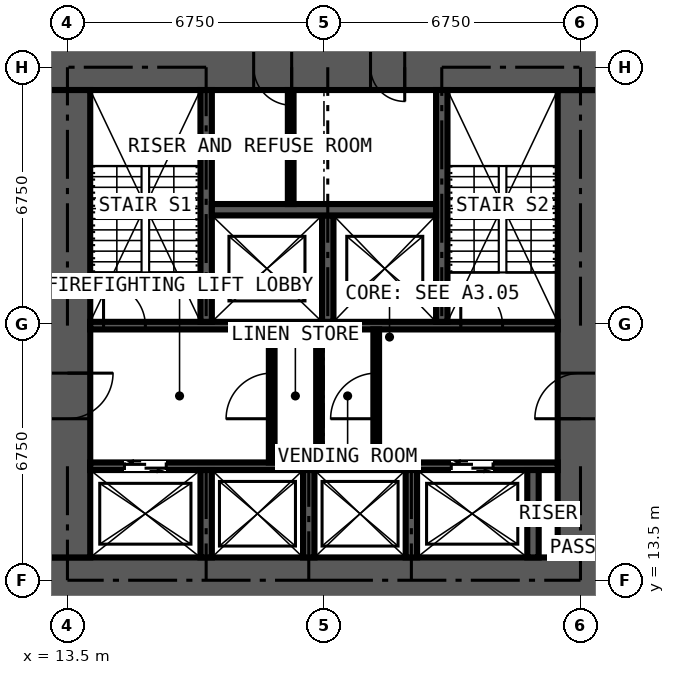
"""IFC4 building model, lengths in metres.
Left out: names, types, materials, properties, quantities, classifications, styles, units other than length and angle.
Written with IfcOpenShell. Run it as: python <this file> out.ifc"""

import sys

from ifc_helpers import new_model, si_unit, direction, frame, frame_2d, origin, place, context, subcontext, project, spatial, rectangle, extrude, element, fill, save


model = new_model("IFC4")
c1 = context("Model", 3, precision=1e-05, world=origin(), true_north=direction((0.0, 1.0)))
c2 = subcontext(c1, "Body", "Model", "MODEL_VIEW")
j1 = project(units=[si_unit("LENGTHUNIT", "METRE"), si_unit("PLANEANGLEUNIT", "RADIAN")], contexts=[c1])
p1 = place(None, origin())
s1 = spatial("IfcSite", under=j1, at=p1, CompositionType="ELEMENT")
p2 = place(p1, origin())
s2 = spatial("IfcBuilding", under=s1, at=p2, CompositionType="ELEMENT")
p3 = place(p2, frame((0.0, 0.0, 87.3)))
s3 = spatial("IfcBuildingStorey", under=s2, at=p3, CompositionType="ELEMENT", Elevation=87.3)
p4 = place(p3, frame((12.9, 13.5, 0.0), z_axis=(0.0, 0.0, 1.0), x_axis=(1.0, 0.0, 0.0)))
e1 = element("IfcWall", 1, at=p4, inside=s3, PredefinedType="SHEAR", context=c2, shape_type="SweptSolid", body=[
    extrude(rectangle(XDim=14.7, YDim=1.2, at=frame_2d((7.35, 0.0))), origin(), (0.0, 0.0, 1.0), 3.6),
])
p5 = place(p3, frame((27.0, 14.1, 0.0), z_axis=(0.0, 0.0, 1.0), x_axis=(0.0, 1.0, 0.0)))
e2 = element("IfcWall", 2, at=p5, inside=s3, PredefinedType="SHEAR", context=c2, shape_type="SweptSolid", body=[
    extrude(rectangle(XDim=12.3, YDim=1.2, at=frame_2d((6.15, 0.0))), origin(), (0.0, 0.0, 1.0), 3.6),
])
p6 = place(p5, frame((3.65, 0.0, 0.0)))
e3 = element("IfcOpeningElement", 3, at=p6, cuts=e2, PredefinedType="OPENING", context=c2, shape_type="SweptSolid", body=[
    extrude(rectangle(XDim=1.2, YDim=2.2, at=frame_2d((0.6, 1.1))), frame((0.0, 0.61, 0.0), z_axis=(0.0, -1.0, 0.0), x_axis=(1.0, 0.0, 0.0)), (0.0, 0.0, 1.0), 1.22),
])
p7 = place(p3, frame((27.6, 27.0, 0.0), z_axis=(0.0, 0.0, 1.0), x_axis=(-1.0, 0.0, 0.0)))
e4 = element("IfcWall", 4, at=p7, inside=s3, PredefinedType="SHEAR", context=c2, shape_type="SweptSolid", body=[
    extrude(rectangle(XDim=14.7, YDim=1.2, at=frame_2d((7.35, 0.0))), origin(), (0.0, 0.0, 1.0), 3.6),
])
p8 = place(p7, frame((5.225, 0.0, 0.0)))
e5 = element("IfcOpeningElement", 5, at=p8, cuts=e4, PredefinedType="OPENING", context=c2, shape_type="SweptSolid", body=[
    extrude(rectangle(XDim=0.9, YDim=2.2, at=frame_2d((0.45, 1.1))), frame((0.0, 0.61, 0.0), z_axis=(0.0, -1.0, 0.0), x_axis=(1.0, 0.0, 0.0)), (0.0, 0.0, 1.0), 1.22),
])
p9 = place(p7, frame((8.2, 0.0, 0.0)))
e6 = element("IfcOpeningElement", 6, at=p9, cuts=e4, PredefinedType="OPENING", context=c2, shape_type="SweptSolid", body=[
    extrude(rectangle(XDim=1.0, YDim=2.2, at=frame_2d((0.5, 1.1))), frame((0.0, 0.61, 0.0), z_axis=(0.0, -1.0, 0.0), x_axis=(1.0, 0.0, 0.0)), (0.0, 0.0, 1.0), 1.22),
])
p10 = place(p3, frame((13.5, 26.4, 0.0), z_axis=(0.0, 0.0, 1.0), x_axis=(0.0, -1.0, 0.0)))
e7 = element("IfcWall", 7, at=p10, inside=s3, PredefinedType="SHEAR", context=c2, shape_type="SweptSolid", body=[
    extrude(rectangle(XDim=12.3, YDim=1.2, at=frame_2d((6.15, 0.0))), origin(), (0.0, 0.0, 1.0), 3.6),
])
p11 = place(p10, frame((7.45, 0.0, 0.0)))
e8 = element("IfcOpeningElement", 8, at=p11, cuts=e7, PredefinedType="OPENING", context=c2, shape_type="SweptSolid", body=[
    extrude(rectangle(XDim=1.2, YDim=2.2, at=frame_2d((0.6, 1.1))), frame((0.0, 0.61, 0.0), z_axis=(0.0, -1.0, 0.0), x_axis=(1.0, 0.0, 0.0)), (0.0, 0.0, 1.0), 1.22),
])
p12 = place(p3, frame((14.1, 16.5, 0.0), z_axis=(0.0, 0.0, 1.0), x_axis=(1.0, 0.0, 0.0)))
e9 = element("IfcWall", 9, at=p12, inside=s3, PredefinedType="SHEAR", context=c2, shape_type="SweptSolid", body=[
    extrude(rectangle(XDim=12.3, YDim=0.2, at=frame_2d((6.15, 0.0))), origin(), (0.0, 0.0, 1.0), 3.6),
])
p13 = place(p12, frame((0.9, 0.0, 0.0)))
e10 = element("IfcOpeningElement", 10, at=p13, cuts=e9, PredefinedType="OPENING", context=c2, shape_type="SweptSolid", body=[
    extrude(rectangle(XDim=1.1, YDim=2.2, at=frame_2d((0.55, 1.1))), frame((0.0, 0.11, 0.0), z_axis=(0.0, -1.0, 0.0), x_axis=(1.0, 0.0, 0.0)), (0.0, 0.0, 1.0), 0.22),
])
p14 = place(p12, frame((9.5, 0.0, 0.0)))
e11 = element("IfcOpeningElement", 11, at=p14, cuts=e9, PredefinedType="OPENING", context=c2, shape_type="SweptSolid", body=[
    extrude(rectangle(XDim=1.1, YDim=2.2, at=frame_2d((0.55, 1.1))), frame((0.0, 0.11, 0.0), z_axis=(0.0, -1.0, 0.0), x_axis=(1.0, 0.0, 0.0)), (0.0, 0.0, 1.0), 0.22),
])
p15 = place(p3, frame((14.1, 20.2, 0.0), z_axis=(0.0, 0.0, 1.0), x_axis=(1.0, 0.0, 0.0)))
e12 = element("IfcWall", 12, at=p15, inside=s3, PredefinedType="SHEAR", context=c2, shape_type="SweptSolid", body=[
    extrude(rectangle(XDim=12.3, YDim=0.2, at=frame_2d((6.15, 0.0))), origin(), (0.0, 0.0, 1.0), 3.6),
])
p16 = place(p15, frame((0.35, 0.0, 0.0)))
e13 = element("IfcOpeningElement", 13, at=p16, cuts=e12, PredefinedType="OPENING", context=c2, shape_type="SweptSolid", body=[
    extrude(rectangle(XDim=1.1, YDim=2.2, at=frame_2d((0.55, 1.1))), frame((0.0, 0.11, 0.0), z_axis=(0.0, -1.0, 0.0), x_axis=(1.0, 0.0, 0.0)), (0.0, 0.0, 1.0), 0.22),
])
p17 = place(p15, frame((9.75, 0.0, 0.0)))
e14 = element("IfcOpeningElement", 14, at=p17, cuts=e12, PredefinedType="OPENING", context=c2, shape_type="SweptSolid", body=[
    extrude(rectangle(XDim=1.1, YDim=2.2, at=frame_2d((0.55, 1.1))), frame((0.0, 0.11, 0.0), z_axis=(0.0, -1.0, 0.0), x_axis=(1.0, 0.0, 0.0)), (0.0, 0.0, 1.0), 0.22),
])
for number, where, z_axis, x_axis in (
    (15, (17.15, 20.3, 0.0), (0.0, 0.0, 1.0), (0.0, 1.0, 0.0)),
    (16, (23.35, 20.3, 0.0), (0.0, 0.0, 1.0), (0.0, 1.0, 0.0)),
):
    element("IfcWall", number, at=place(p3, frame(where, z_axis=z_axis, x_axis=x_axis)), inside=s3, PredefinedType="SHEAR", context=c2, shape_type="SweptSolid", body=[
        extrude(rectangle(XDim=6.1, YDim=0.3, at=frame_2d((3.05, 0.0))), origin(), (0.0, 0.0, 1.0), 3.6),
    ])
p18 = place(p3, frame((20.35, 20.3, 0.0), z_axis=(0.0, 0.0, 1.0), x_axis=(0.0, 1.0, 0.0)))
e17 = element("IfcWall", 17, at=p18, inside=s3, PredefinedType="SHEAR", context=c2, shape_type="SweptSolid", body=[
    extrude(rectangle(XDim=2.8, YDim=0.3, at=frame_2d((1.4, 0.0))), origin(), (0.0, 0.0, 1.0), 3.6),
])
p19 = place(p3, frame((17.3, 23.25, 0.0), z_axis=(0.0, 0.0, 1.0), x_axis=(1.0, 0.0, 0.0)))
e18 = element("IfcWall", 18, at=p19, inside=s3, PredefinedType="SHEAR", context=c2, shape_type="SweptSolid", body=[
    extrude(rectangle(XDim=5.9, YDim=0.3, at=frame_2d((2.95, 0.0))), origin(), (0.0, 0.0, 1.0), 3.6),
])
for number, where, z_axis, x_axis in (
    (19, (17.15, 14.1, 0.0), (0.0, 0.0, 1.0), (0.0, 1.0, 0.0)),
    (20, (19.85, 14.1, 0.0), (0.0, 0.0, 1.0), (0.0, 1.0, 0.0)),
    (21, (22.55, 14.1, 0.0), (0.0, 0.0, 1.0), (0.0, 1.0, 0.0)),
    (22, (25.75, 14.1, 0.0), (0.0, 0.0, 1.0), (0.0, 1.0, 0.0)),
):
    element("IfcWall", number, at=place(p3, frame(where, z_axis=z_axis, x_axis=x_axis)), inside=s3, PredefinedType="SHEAR", context=c2, shape_type="SweptSolid", body=[
        extrude(rectangle(XDim=2.3, YDim=0.3, at=frame_2d((1.15, 0.0))), origin(), (0.0, 0.0, 1.0), 3.6),
    ])
p20 = place(p3, frame((18.875, 16.6, 0.0), z_axis=(0.0, 0.0, 1.0), x_axis=(0.0, 1.0, 0.0)))
e23 = element("IfcWall", 23, at=p20, inside=s3, PredefinedType="PARTITIONING", context=c2, shape_type="SweptSolid", body=[
    extrude(rectangle(XDim=3.5, YDim=0.15, at=frame_2d((1.75, 0.0))), origin(), (0.0, 0.0, 1.0), 3.375),
])
p21 = place(p20, frame((1.15, 0.0, 0.0)))
e24 = element("IfcOpeningElement", 24, at=p21, cuts=e23, PredefinedType="OPENING", context=c2, shape_type="SweptSolid", body=[
    extrude(rectangle(XDim=1.2, YDim=2.2, at=frame_2d((0.6, 1.1))), frame((0.0, 0.085, 0.0), z_axis=(0.0, -1.0, 0.0), x_axis=(1.0, 0.0, 0.0)), (0.0, 0.0, 1.0), 0.17),
])
p22 = place(p3, frame((21.625, 16.6, 0.0), z_axis=(0.0, 0.0, 1.0), x_axis=(0.0, 1.0, 0.0)))
e25 = element("IfcWall", 25, at=p22, inside=s3, PredefinedType="PARTITIONING", context=c2, shape_type="SweptSolid", body=[
    extrude(rectangle(XDim=3.5, YDim=0.15, at=frame_2d((1.75, 0.0))), origin(), (0.0, 0.0, 1.0), 3.375),
])
p23 = place(p22, frame((1.15, 0.0, 0.0)))
e26 = element("IfcOpeningElement", 26, at=p23, cuts=e25, PredefinedType="OPENING", context=c2, shape_type="SweptSolid", body=[
    extrude(rectangle(XDim=1.2, YDim=2.2, at=frame_2d((0.6, 1.1))), frame((0.0, 0.085, 0.0), z_axis=(0.0, -1.0, 0.0), x_axis=(1.0, 0.0, 0.0)), (0.0, 0.0, 1.0), 0.17),
])
p24 = place(p3, frame((20.12, 16.6, 0.0), z_axis=(0.0, 0.0, 1.0), x_axis=(0.0, 1.0, 0.0)))
e27 = element("IfcWall", 27, at=p24, inside=s3, PredefinedType="PARTITIONING", context=c2, shape_type="SweptSolid", body=[
    extrude(rectangle(XDim=3.5, YDim=0.15, at=frame_2d((1.75, 0.0))), origin(), (0.0, 0.0, 1.0), 3.375),
])
p25 = place(p3, frame((19.375, 23.4, 0.0), z_axis=(0.0, 0.0, 1.0), x_axis=(0.0, 1.0, 0.0)))
e28 = element("IfcWall", 28, at=p25, inside=s3, PredefinedType="PARTITIONING", context=c2, shape_type="SweptSolid", body=[
    extrude(rectangle(XDim=3.0, YDim=0.15, at=frame_2d((1.5, 0.0))), origin(), (0.0, 0.0, 1.0), 3.375),
])
p26 = place(p13, origin())
e29 = element("IfcDoor", 29, at=p26, inside=s3, OperationType="DOUBLE_DOOR_SLIDING", PredefinedType="DOOR", context=c2, shape_type="SweptSolid", body=[
    extrude(rectangle(XDim=1.1, YDim=2.2, at=frame_2d((0.55, 1.1))), frame((0.0, 0.025, 0.0), z_axis=(0.0, -1.0, 0.0), x_axis=(1.0, 0.0, 0.0)), (0.0, 0.0, 1.0), 0.05),
])
fill(e10, e29)
p27 = place(p14, origin())
e30 = element("IfcDoor", 30, at=p27, inside=s3, OperationType="DOUBLE_DOOR_SLIDING", PredefinedType="DOOR", context=c2, shape_type="SweptSolid", body=[
    extrude(rectangle(XDim=1.1, YDim=2.2, at=frame_2d((0.55, 1.1))), frame((0.0, 0.025, 0.0), z_axis=(0.0, -1.0, 0.0), x_axis=(1.0, 0.0, 0.0)), (0.0, 0.0, 1.0), 0.05),
])
fill(e11, e30)
p28 = place(p11, origin())
e31 = element("IfcDoor", 31, at=p28, inside=s3, OperationType="DOUBLE_DOOR_SINGLE_SWING", PredefinedType="DOOR", context=c2, shape_type="SweptSolid", body=[
    extrude(rectangle(XDim=1.2, YDim=2.2, at=frame_2d((0.6, 1.1))), frame((0.0, 0.025, 0.0), z_axis=(0.0, -1.0, 0.0), x_axis=(1.0, 0.0, 0.0)), (0.0, 0.0, 1.0), 0.05),
])
fill(e8, e31)
p29 = place(p6, origin())
e32 = element("IfcDoor", 32, at=p29, inside=s3, OperationType="DOUBLE_DOOR_SINGLE_SWING", PredefinedType="DOOR", context=c2, shape_type="SweptSolid", body=[
    extrude(rectangle(XDim=1.2, YDim=2.2, at=frame_2d((0.6, 1.1))), frame((0.0, 0.025, 0.0), z_axis=(0.0, -1.0, 0.0), x_axis=(1.0, 0.0, 0.0)), (0.0, 0.0, 1.0), 0.05),
])
fill(e3, e32)
p30 = place(p21, origin())
e33 = element("IfcDoor", 33, at=p30, inside=s3, OperationType="DOUBLE_DOOR_SINGLE_SWING", PredefinedType="DOOR", context=c2, shape_type="SweptSolid", body=[
    extrude(rectangle(XDim=1.2, YDim=2.2, at=frame_2d((0.6, 1.1))), frame((0.0, 0.025, 0.0), z_axis=(0.0, -1.0, 0.0), x_axis=(1.0, 0.0, 0.0)), (0.0, 0.0, 1.0), 0.05),
])
fill(e24, e33)
p31 = place(p23, origin())
e34 = element("IfcDoor", 34, at=p31, inside=s3, OperationType="DOUBLE_DOOR_SINGLE_SWING", PredefinedType="DOOR", context=c2, shape_type="SweptSolid", body=[
    extrude(rectangle(XDim=1.2, YDim=2.2, at=frame_2d((0.6, 1.1))), frame((0.0, 0.025, 0.0), z_axis=(0.0, -1.0, 0.0), x_axis=(1.0, 0.0, 0.0)), (0.0, 0.0, 1.0), 0.05),
])
fill(e26, e34)
p32 = place(p8, origin())
e35 = element("IfcDoor", 35, at=p32, inside=s3, OperationType="SINGLE_SWING_LEFT", PredefinedType="DOOR", context=c2, shape_type="SweptSolid", body=[
    extrude(rectangle(XDim=0.9, YDim=2.2, at=frame_2d((0.45, 1.1))), frame((0.0, 0.4, 0.0), z_axis=(0.0, -1.0, 0.0), x_axis=(1.0, 0.0, 0.0)), (0.0, 0.0, 1.0), 0.8),
])
fill(e5, e35)
p33 = place(p9, origin())
e36 = element("IfcDoor", 36, at=p33, inside=s3, OperationType="SINGLE_SWING_LEFT", PredefinedType="DOOR", context=c2, shape_type="SweptSolid", body=[
    extrude(rectangle(XDim=1.0, YDim=2.2, at=frame_2d((0.5, 1.1))), frame((0.0, 0.025, 0.0), z_axis=(0.0, -1.0, 0.0), x_axis=(1.0, 0.0, 0.0)), (0.0, 0.0, 1.0), 0.05),
])
fill(e6, e36)
p34 = place(p16, origin())
e37 = element("IfcDoor", 37, at=p34, inside=s3, OperationType="SINGLE_SWING_LEFT", PredefinedType="DOOR", context=c2, shape_type="SweptSolid", body=[
    extrude(rectangle(XDim=1.1, YDim=2.2, at=frame_2d((0.55, 1.1))), frame((0.0, 0.025, 0.0), z_axis=(0.0, -1.0, 0.0), x_axis=(1.0, 0.0, 0.0)), (0.0, 0.0, 1.0), 0.05),
])
fill(e13, e37)
p35 = place(p17, origin())
e38 = element("IfcDoor", 38, at=p35, inside=s3, OperationType="SINGLE_SWING_LEFT", PredefinedType="DOOR", context=c2, shape_type="SweptSolid", body=[
    extrude(rectangle(XDim=1.1, YDim=2.2, at=frame_2d((0.55, 1.1))), frame((0.0, 0.025, 0.0), z_axis=(0.0, -1.0, 0.0), x_axis=(1.0, 0.0, 0.0)), (0.0, 0.0, 1.0), 0.05),
])
fill(e14, e38)
save(model, sys.argv[1])
